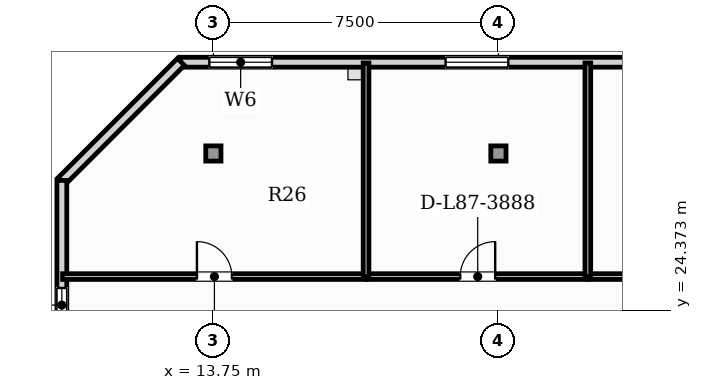
"""IFC4 building model, lengths in metres.
Left out: names, types, materials, properties, quantities, classifications, styles, units other than length and angle.
Written with IfcOpenShell. Run it as: python <this file> out.ifc"""

import sys

from ifc_helpers import new_model, si_unit, direction, frame, frame_2d, origin, origin_2d, place, context, subcontext, project, spatial, rectangle, hollow_rectangle, extrude, element, fill, save


model = new_model("IFC4")
c1 = context("Model", 3, precision=1e-05, world=origin(), true_north=direction((0.0, 1.0)))
c2 = subcontext(c1, "Body", "Model", "MODEL_VIEW")
j1 = project(units=[si_unit("LENGTHUNIT", "METRE"), si_unit("PLANEANGLEUNIT", "RADIAN")], contexts=[c1])
p1 = place(None, origin())
s1 = spatial("IfcSite", under=j1, at=p1, CompositionType="ELEMENT")
p2 = place(p1, origin())
s2 = spatial("IfcBuilding", under=s1, at=p2, CompositionType="ELEMENT")
p3 = place(p2, frame((0.0, 0.0, 353.45)))
s3 = spatial("IfcBuildingStorey", under=s2, at=p3, CompositionType="ELEMENT", Elevation=353.45)
for number, where, z_axis, x_axis in (
    (1, (13.75, 28.5, 0.0), (0.0, 0.0, 1.0), (1.0, 0.0, 0.0)),
    (2, (21.25, 28.5, 0.0), (0.0, 0.0, 1.0), (1.0, 0.0, 0.0)),
):
    element("IfcColumn", number, at=place(p3, frame(where, z_axis=z_axis, x_axis=x_axis)), inside=s3, PredefinedType="COLUMN", context=c2, shape_type="SweptSolid", body=[
        extrude(hollow_rectangle(XDim=0.4, YDim=0.4, WallThickness=0.02, at=origin_2d()), origin(), (0.0, 0.0, 1.0), 4.4),
    ])
p4 = place(p3, frame((44.627, 30.901, 0.0), z_axis=(0.0, 0.0, 1.0), x_axis=(-1.0, 0.0, 0.0)))
e3 = element("IfcWall", 3, at=p4, inside=s3, PredefinedType="SOLIDWALL", context=c2, shape_type="SweptSolid", body=[
    extrude(rectangle(XDim=31.754, YDim=0.26, at=frame_2d((15.877, 0.0))), origin(), (0.0, 0.0, 1.0), 4.14),
])
p5 = place(p4, frame((29.334, 0.0, 0.88)))
e4 = element("IfcOpeningElement", 4, at=p5, cuts=e3, PredefinedType="OPENING", context=c2, shape_type="SweptSolid", body=[
    extrude(rectangle(XDim=1.65, YDim=2.0, at=frame_2d((0.825, 1.0))), frame((0.0, 0.14, 0.0), z_axis=(0.0, -1.0, 0.0), x_axis=(1.0, 0.0, 0.0)), (0.0, 0.0, 1.0), 0.28),
])
p6 = place(p4, frame((23.117, 0.0, 0.88)))
e5 = element("IfcOpeningElement", 5, at=p6, cuts=e3, PredefinedType="OPENING", context=c2, shape_type="SweptSolid", body=[
    extrude(rectangle(XDim=1.65, YDim=2.0, at=frame_2d((0.825, 1.0))), frame((0.0, 0.14, 0.0), z_axis=(0.0, -1.0, 0.0), x_axis=(1.0, 0.0, 0.0)), (0.0, 0.0, 1.0), 0.28),
])
p7 = place(p4, frame((17.469, 0.0, 0.88)))
e6 = element("IfcOpeningElement", 6, at=p7, cuts=e3, PredefinedType="OPENING", context=c2, shape_type="SweptSolid", body=[
    extrude(rectangle(XDim=1.65, YDim=2.0, at=frame_2d((0.825, 1.0))), frame((0.0, 0.14, 0.0), z_axis=(0.0, -1.0, 0.0), x_axis=(1.0, 0.0, 0.0)), (0.0, 0.0, 1.0), 0.28),
])
p8 = place(p4, frame((11.146, 0.0, 0.88)))
e7 = element("IfcOpeningElement", 7, at=p8, cuts=e3, PredefinedType="OPENING", context=c2, shape_type="SweptSolid", body=[
    extrude(rectangle(XDim=1.65, YDim=2.0, at=frame_2d((0.825, 1.0))), frame((0.0, 0.14, 0.0), z_axis=(0.0, -1.0, 0.0), x_axis=(1.0, 0.0, 0.0)), (0.0, 0.0, 1.0), 0.28),
])
p9 = place(p4, frame((4.732, 0.0, 0.88)))
e8 = element("IfcOpeningElement", 8, at=p9, cuts=e3, PredefinedType="OPENING", context=c2, shape_type="SweptSolid", body=[
    extrude(rectangle(XDim=1.65, YDim=2.0, at=frame_2d((0.825, 1.0))), frame((0.0, 0.14, 0.0), z_axis=(0.0, -1.0, 0.0), x_axis=(1.0, 0.0, 0.0)), (0.0, 0.0, 1.0), 0.28),
])
p10 = place(p3, frame((12.896, 30.911, 0.0), z_axis=(0.0, 0.0, 1.0), x_axis=(-0.707134240044, -0.707079321262, 0.0)))
e9 = element("IfcWall", 9, at=p10, inside=s3, PredefinedType="SOLIDWALL", context=c2, shape_type="SweptSolid", body=[
    extrude(rectangle(XDim=4.446, YDim=0.26, at=frame_2d((2.223, 0.0))), origin(), (0.0, 0.0, 1.0), 4.14),
])
p11 = place(p3, frame((9.763, 27.791, 0.0), z_axis=(0.0, 0.0, 1.0), x_axis=(0.0, -1.0, 0.0)))
e10 = element("IfcWall", 10, at=p11, inside=s3, PredefinedType="SOLIDWALL", context=c2, shape_type="SweptSolid", body=[
    extrude(rectangle(XDim=24.551, YDim=0.26, at=frame_2d((12.276, 0.0))), origin(), (0.0, 0.0, 1.0), 4.14),
])
p12 = place(p11, frame((18.651, 0.0, 0.85)))
e11 = element("IfcOpeningElement", 11, at=p12, cuts=e10, PredefinedType="OPENING", context=c2, shape_type="SweptSolid", body=[
    extrude(rectangle(XDim=2.1, YDim=2.05, at=frame_2d((1.05, 1.025))), frame((0.0, 0.14, 0.0), z_axis=(0.0, -1.0, 0.0), x_axis=(1.0, 0.0, 0.0)), (0.0, 0.0, 1.0), 0.28),
])
p13 = place(p11, frame((2.83, 0.0, 0.95)))
e12 = element("IfcOpeningElement", 12, at=p13, cuts=e10, PredefinedType="OPENING", context=c2, shape_type="SweptSolid", body=[
    extrude(rectangle(XDim=0.9, YDim=1.5, at=frame_2d((0.45, 0.75))), frame((0.0, 0.14, 0.0), z_axis=(0.0, -1.0, 0.0), x_axis=(1.0, 0.0, 0.0)), (0.0, 0.0, 1.0), 0.28),
])
p14 = place(p11, frame((11.406, 0.0, 0.95)))
e13 = element("IfcOpeningElement", 13, at=p14, cuts=e10, PredefinedType="OPENING", context=c2, shape_type="SweptSolid", body=[
    extrude(rectangle(XDim=0.9, YDim=1.5, at=frame_2d((0.45, 0.75))), frame((0.0, 0.14, 0.0), z_axis=(0.0, -1.0, 0.0), x_axis=(1.0, 0.0, 0.0)), (0.0, 0.0, 1.0), 0.28),
])
p15 = place(p11, frame((6.661, 0.0, 0.88)))
e14 = element("IfcOpeningElement", 14, at=p15, cuts=e10, PredefinedType="OPENING", context=c2, shape_type="SweptSolid", body=[
    extrude(rectangle(XDim=1.65, YDim=2.0, at=frame_2d((0.825, 1.0))), frame((0.0, 0.14, 0.0), z_axis=(0.0, -1.0, 0.0), x_axis=(1.0, 0.0, 0.0)), (0.0, 0.0, 1.0), 0.28),
])
p16 = place(p3, frame((9.782, 25.261, 0.0), z_axis=(0.0, 0.0, 1.0), x_axis=(1.0, 0.0, 0.0)))
e15 = element("IfcWall", 15, at=p16, inside=s3, PredefinedType="PARTITIONING", context=c2, shape_type="SweptSolid", body=[
    extrude(rectangle(XDim=7.99, YDim=0.15, at=frame_2d((3.995, 0.0))), origin(), (0.0, 0.0, 1.0), 4.14),
])
p17 = place(p16, frame((3.535, 0.0, 0.0)))
e16 = element("IfcOpeningElement", 16, at=p17, cuts=e15, PredefinedType="OPENING", context=c2, shape_type="SweptSolid", body=[
    extrude(rectangle(XDim=0.92, YDim=2.1, at=frame_2d((0.46, 1.05))), frame((0.0, 0.085, 0.0), z_axis=(0.0, -1.0, 0.0), x_axis=(1.0, 0.0, 0.0)), (0.0, 0.0, 1.0), 0.17),
])
p18 = place(p3, frame((17.802, 25.261, 0.0), z_axis=(0.0, 0.0, 1.0), x_axis=(1.0, 0.0, 0.0)))
e17 = element("IfcWall", 17, at=p18, inside=s3, PredefinedType="PARTITIONING", context=c2, shape_type="SweptSolid", body=[
    extrude(rectangle(XDim=5.806, YDim=0.15, at=frame_2d((2.903, 0.0))), origin(), (0.0, 0.0, 1.0), 4.14),
])
p19 = place(p18, frame((2.443, 0.0, 0.0)))
e18 = element("IfcOpeningElement", 18, at=p19, cuts=e17, PredefinedType="OPENING", context=c2, shape_type="SweptSolid", body=[
    extrude(rectangle(XDim=0.92, YDim=2.1, at=frame_2d((0.46, 1.05))), frame((0.0, 0.085, 0.0), z_axis=(0.0, -1.0, 0.0), x_axis=(1.0, 0.0, 0.0)), (0.0, 0.0, 1.0), 0.17),
])
p20 = place(p3, frame((23.638, 25.261, 0.0), z_axis=(0.0, 0.0, 1.0), x_axis=(1.0, 0.0, 0.0)))
e19 = element("IfcWall", 19, at=p20, inside=s3, PredefinedType="PARTITIONING", context=c2, shape_type="SweptSolid", body=[
    extrude(rectangle(XDim=5.429, YDim=0.15, at=frame_2d((2.714, 0.0))), origin(), (0.0, 0.0, 1.0), 4.14),
])
p21 = place(p20, frame((2.254, 0.0, 0.0)))
e20 = element("IfcOpeningElement", 20, at=p21, cuts=e19, PredefinedType="OPENING", context=c2, shape_type="SweptSolid", body=[
    extrude(rectangle(XDim=0.92, YDim=2.1, at=frame_2d((0.46, 1.05))), frame((0.0, 0.085, 0.0), z_axis=(0.0, -1.0, 0.0), x_axis=(1.0, 0.0, 0.0)), (0.0, 0.0, 1.0), 0.17),
])
for number, where, z_axis, x_axis in (
    (21, (17.767, 25.256, 0.0), (0.0, 0.0, 1.0), (0.0, 1.0, 0.0)),
    (22, (23.603, 25.256, 0.0), (0.0, 0.0, 1.0), (0.0, 1.0, 0.0)),
):
    element("IfcWall", number, at=place(p3, frame(where, z_axis=z_axis, x_axis=x_axis)), inside=s3, PredefinedType="PARTITIONING", context=c2, shape_type="SweptSolid", body=[
        extrude(rectangle(XDim=5.625, YDim=0.15, at=frame_2d((2.813, 0.0))), origin(), (0.0, 0.0, 1.0), 4.14),
    ])
p22 = place(p13, origin())
e23 = element("IfcWindow", 23, at=p22, inside=s3, PartitioningType="SINGLE_PANEL", PredefinedType="WINDOW", context=c2, shape_type="SweptSolid", body=[
    extrude(rectangle(XDim=0.9, YDim=1.5, at=frame_2d((0.45, 0.75))), frame((0.0, 0.03, 0.0), z_axis=(0.0, -1.0, 0.0), x_axis=(1.0, 0.0, 0.0)), (0.0, 0.0, 1.0), 0.06),
])
fill(e12, e23)
p23 = place(p5, origin())
e24 = element("IfcWindow", 24, at=p23, inside=s3, PartitioningType="SINGLE_PANEL", PredefinedType="WINDOW", context=c2, shape_type="SweptSolid", body=[
    extrude(rectangle(XDim=1.65, YDim=2.0, at=frame_2d((0.825, 1.0))), frame((0.0, 0.03, 0.0), z_axis=(0.0, -1.0, 0.0), x_axis=(1.0, 0.0, 0.0)), (0.0, 0.0, 1.0), 0.06),
])
fill(e4, e24)
p24 = place(p6, origin())
e25 = element("IfcWindow", 25, at=p24, inside=s3, PartitioningType="SINGLE_PANEL", PredefinedType="WINDOW", context=c2, shape_type="SweptSolid", body=[
    extrude(rectangle(XDim=1.65, YDim=2.0, at=frame_2d((0.825, 1.0))), frame((0.0, 0.03, 0.0), z_axis=(0.0, -1.0, 0.0), x_axis=(1.0, 0.0, 0.0)), (0.0, 0.0, 1.0), 0.06),
])
fill(e5, e25)
p25 = place(p17, origin())
e26 = element("IfcDoor", 26, at=p25, inside=s3, OperationType="SINGLE_SWING_LEFT", PredefinedType="DOOR", context=c2, shape_type="SweptSolid", body=[
    extrude(rectangle(XDim=0.92, YDim=2.1, at=frame_2d((0.46, 1.05))), frame((0.0, 0.025, 0.0), z_axis=(0.0, -1.0, 0.0), x_axis=(1.0, 0.0, 0.0)), (0.0, 0.0, 1.0), 0.05),
])
fill(e16, e26)
p26 = place(p19, origin())
e27 = element("IfcDoor", 27, at=p26, inside=s3, OperationType="SINGLE_SWING_RIGHT", PredefinedType="DOOR", context=c2, shape_type="SweptSolid", body=[
    extrude(rectangle(XDim=0.92, YDim=2.1, at=frame_2d((0.46, 1.05))), frame((0.0, 0.025, 0.0), z_axis=(0.0, -1.0, 0.0), x_axis=(1.0, 0.0, 0.0)), (0.0, 0.0, 1.0), 0.05),
])
fill(e18, e27)
save(model, sys.argv[1])
